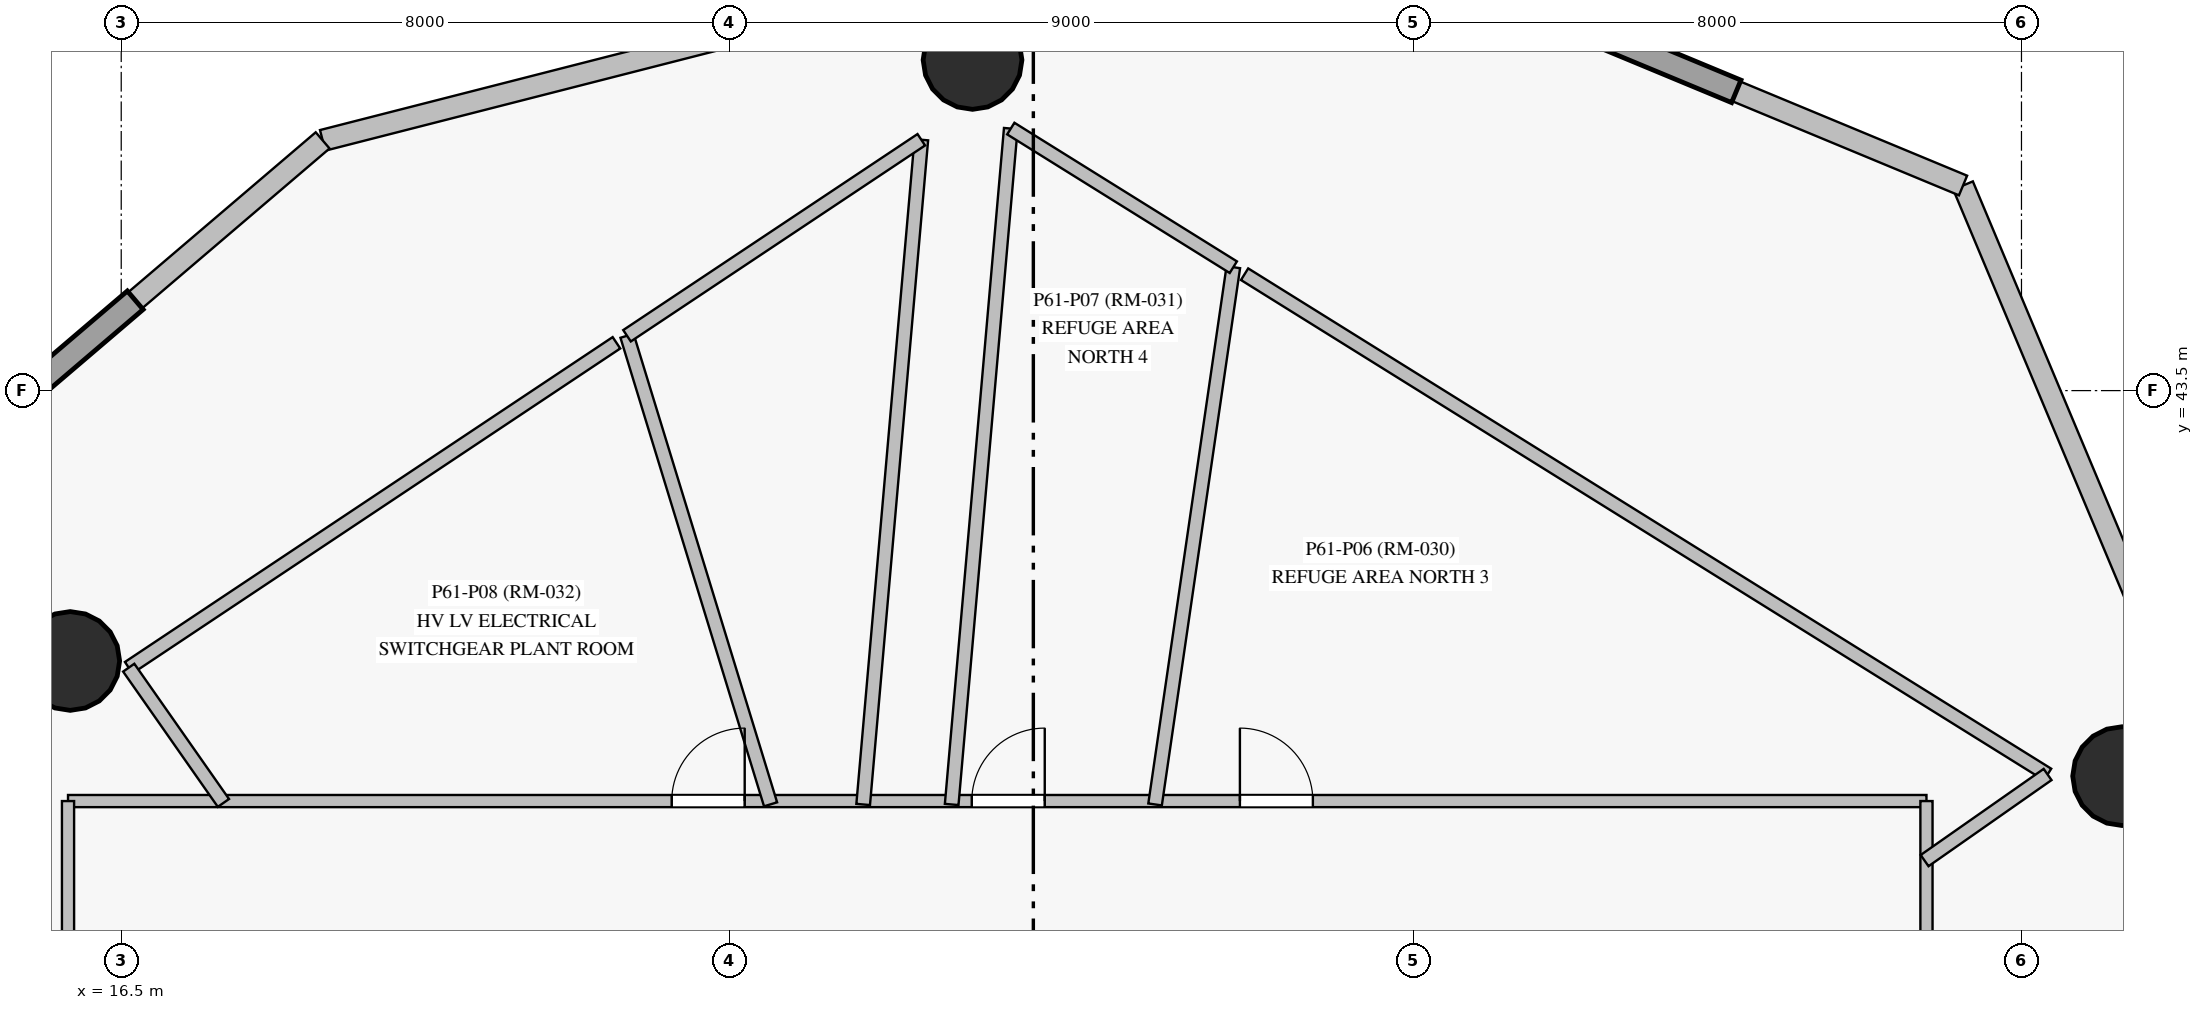
"""IFC4 building model, lengths in metres.
Left out: names, types, materials, properties, quantities, classifications, styles, units other than length and angle.
Written with IfcOpenShell. Run it as: python <this file> out.ifc"""

import sys

from ifc_helpers import new_model, si_unit, direction, frame, frame_2d, origin, origin_with_axes, origin_2d, place, context, subcontext, project, spatial, rectangle, circle, extrude, source, transform, mapped, element, fill, save


model = new_model("IFC4")
c1 = context("Model", 3, precision=1e-05, world=origin(), true_north=direction((0.0, 1.0)))
c2 = subcontext(c1, "Body", "Model", "MODEL_VIEW")
j1 = project(units=[si_unit("LENGTHUNIT", "METRE"), si_unit("PLANEANGLEUNIT", "RADIAN")], contexts=[c1])
p1 = place(None, origin())
s1 = spatial("IfcSite", under=j1, at=p1, CompositionType="ELEMENT")
p2 = place(p1, origin())
s2 = spatial("IfcBuilding", under=s1, at=p2, CompositionType="ELEMENT")
p3 = place(p2, frame((0.0, 0.0, 208.4)))
s3 = spatial("IfcBuildingStorey", under=s2, at=p3, CompositionType="ELEMENT", Elevation=208.4)
m1 = source(origin_with_axes(), c2, "Body", "SweptSolid", [
    extrude(circle(Radius=0.65, at=origin_2d()), origin(), (0.0, 0.0, 1.0), 4.5),
])
for number, where, z_axis, x_axis in (
    (1, (42.824, 38.428, 0.0), (0.0, 0.0, 1.0), (1.0, 0.0, 0.0)),
    (2, (27.7, 47.85, 0.0), (0.0, 0.0, 1.0), (1.0, 0.0, 0.0)),
    (3, (15.829, 39.943, 0.0), (0.0, 0.0, 1.0), (1.0, 0.0, 0.0)),
):
    element("IfcColumn", number, at=place(p3, frame(where, z_axis=z_axis, x_axis=x_axis)), inside=s3, PredefinedType="COLUMN", context=c2, shape_type="MappedRepresentation", body=[
        mapped(m1, transform((0.0, 0.0, 0.0), scale=1.0)),
    ])
p4 = place(p3, frame((45.891, 33.9, 0.0), z_axis=(0.0, 0.0, 1.0), x_axis=(-0.386897911947, 0.922122554616, 0.0)))
e4 = element("IfcWall", 4, at=p4, inside=s3, PredefinedType="SOLIDWALL", context=c2, shape_type="SweptSolid", body=[
    extrude(rectangle(XDim=13.337, YDim=0.28, at=frame_2d((6.668, 0.0))), origin(), (0.0, 0.0, 1.0), 4.3),
])
p5 = place(p3, frame((40.731, 46.198, 0.0), z_axis=(0.0, 0.0, 1.0), x_axis=(-0.92356916521, 0.383431867576, 0.0)))
e5 = element("IfcWall", 5, at=p5, inside=s3, PredefinedType="SOLIDWALL", context=c2, shape_type="SweptSolid", body=[
    extrude(rectangle(XDim=9.86, YDim=0.28, at=frame_2d((4.93, 0.0))), origin(), (0.0, 0.0, 1.0), 4.3),
])
p6 = place(p3, frame((31.625, 49.979, 0.0), z_axis=(0.0, 0.0, 1.0), x_axis=(-0.968880372011, -0.247529442153, 0.0)))
e6 = element("IfcWall", 6, at=p6, inside=s3, PredefinedType="SOLIDWALL", context=c2, shape_type="SweptSolid", body=[
    extrude(rectangle(XDim=12.875, YDim=0.28, at=frame_2d((6.438, 0.0))), origin(), (0.0, 0.0, 1.0), 4.3),
])
p7 = place(p3, frame((19.15, 46.792, 0.0), z_axis=(0.0, 0.0, 1.0), x_axis=(-0.760792690148, -0.648994978885, 0.0)))
e7 = element("IfcWall", 7, at=p7, inside=s3, PredefinedType="SOLIDWALL", context=c2, shape_type="SweptSolid", body=[
    extrude(rectangle(XDim=9.882, YDim=0.28, at=frame_2d((4.941, 0.0))), origin(), (0.0, 0.0, 1.0), 4.3),
])
p8 = place(p3, frame((15.8, 38.1, 0.0), z_axis=(0.0, 0.0, 1.0), x_axis=(1.0, 0.0, 0.0)))
e8 = element("IfcWall", 8, at=p8, inside=s3, PredefinedType="PARTITIONING", context=c2, shape_type="SweptSolid", body=[
    extrude(rectangle(XDim=24.45, YDim=0.16, at=frame_2d((12.225, 0.0))), origin(), (0.0, 0.0, 1.0), 3.0),
])
p9 = place(p8, frame((15.417, 0.0, 0.0)))
e9 = element("IfcOpeningElement", 9, at=p9, cuts=e8, PredefinedType="OPENING", context=c2, shape_type="SweptSolid", body=[
    extrude(rectangle(XDim=0.96, YDim=2.15, at=frame_2d((0.48, 1.075))), frame((0.0, 0.09, 0.0), z_axis=(0.0, -1.0, 0.0), x_axis=(1.0, 0.0, 0.0)), (0.0, 0.0, 1.0), 0.18),
])
p10 = place(p8, frame((11.89, 0.0, 0.0)))
e10 = element("IfcOpeningElement", 10, at=p10, cuts=e8, PredefinedType="OPENING", context=c2, shape_type="SweptSolid", body=[
    extrude(rectangle(XDim=0.96, YDim=2.15, at=frame_2d((0.48, 1.075))), frame((0.0, 0.09, 0.0), z_axis=(0.0, -1.0, 0.0), x_axis=(1.0, 0.0, 0.0)), (0.0, 0.0, 1.0), 0.18),
])
p11 = place(p8, frame((7.942, 0.0, 0.0)))
e11 = element("IfcOpeningElement", 11, at=p11, cuts=e8, PredefinedType="OPENING", context=c2, shape_type="SweptSolid", body=[
    extrude(rectangle(XDim=0.96, YDim=2.15, at=frame_2d((0.48, 1.075))), frame((0.0, 0.09, 0.0), z_axis=(0.0, -1.0, 0.0), x_axis=(1.0, 0.0, 0.0)), (0.0, 0.0, 1.0), 0.18),
])
p12 = place(p3, frame((15.8, 15.1, 0.0), z_axis=(0.0, 0.0, 1.0), x_axis=(0.0, 1.0, 0.0)))
e12 = element("IfcWall", 12, at=p12, inside=s3, PredefinedType="PARTITIONING", context=c2, shape_type="SweptSolid", body=[
    extrude(rectangle(XDim=23.0, YDim=0.16, at=frame_2d((11.5, 0.0))), origin(), (0.0, 0.0, 1.0), 3.0),
])
p13 = place(p12, frame((11.025, 0.0, 0.0)))
e13 = element("IfcOpeningElement", 13, at=p13, cuts=e12, PredefinedType="OPENING", context=c2, shape_type="SweptSolid", body=[
    extrude(rectangle(XDim=0.96, YDim=2.15, at=frame_2d((0.48, 1.075))), frame((0.0, 0.09, 0.0), z_axis=(0.0, -1.0, 0.0), x_axis=(1.0, 0.0, 0.0)), (0.0, 0.0, 1.0), 0.18),
])
p14 = place(p3, frame((40.25, 38.1, 0.0), z_axis=(0.0, 0.0, 1.0), x_axis=(0.0, -1.0, 0.0)))
e14 = element("IfcWall", 14, at=p14, inside=s3, PredefinedType="PARTITIONING", context=c2, shape_type="SweptSolid", body=[
    extrude(rectangle(XDim=23.0, YDim=0.16, at=frame_2d((11.5, 0.0))), origin(), (0.0, 0.0, 1.0), 3.0),
])
p15 = place(p3, frame((31.279, 45.031, 0.0), z_axis=(0.0, 0.0, 1.0), x_axis=(0.848769854384, -0.528762455445, 0.0)))
e15 = element("IfcWall", 15, at=p15, inside=s3, PredefinedType="PARTITIONING", context=c2, shape_type="SweptSolid", body=[
    extrude(rectangle(XDim=12.447, YDim=0.18, at=frame_2d((6.224, 0.0))), origin(), (0.0, 0.0, 1.0), 3.4),
])
p16 = place(p3, frame((27.426, 38.055, 0.0), z_axis=(0.0, 0.0, 1.0), x_axis=(0.087139468031, 0.996196121811, 0.0)))
e16 = element("IfcWall", 16, at=p16, inside=s3, PredefinedType="PARTITIONING", context=c2, shape_type="SweptSolid", body=[
    extrude(rectangle(XDim=8.926, YDim=0.18, at=frame_2d((4.463, 0.0))), origin(), (0.0, 0.0, 1.0), 2.8),
])
p17 = place(p3, frame((27.026, 46.8, 0.0), z_axis=(0.0, 0.0, 1.0), x_axis=(-0.08710485024, -0.996199149299, 0.0)))
e17 = element("IfcWall", 17, at=p17, inside=s3, PredefinedType="PARTITIONING", context=c2, shape_type="SweptSolid", body=[
    extrude(rectangle(XDim=8.779, YDim=0.18, at=frame_2d((4.389, 0.0))), origin(), (0.0, 0.0, 1.0), 2.8),
])
p18 = place(p3, frame((16.599, 39.855, 0.0), z_axis=(0.0, 0.0, 1.0), x_axis=(0.832284063484, 0.554349382313, 0.0)))
e18 = element("IfcWall", 18, at=p18, inside=s3, PredefinedType="PARTITIONING", context=c2, shape_type="SweptSolid", body=[
    extrude(rectangle(XDim=7.71, YDim=0.18, at=frame_2d((3.855, 0.0))), origin(), (0.0, 0.0, 1.0), 3.4),
])
p19 = place(p3, frame((31.131, 45.124, 0.0), z_axis=(0.0, 0.0, 1.0), x_axis=(-0.144105380013, -0.98956234743, 0.0)))
e19 = element("IfcWall", 19, at=p19, inside=s3, PredefinedType="PARTITIONING", context=c2, shape_type="SweptSolid", body=[
    extrude(rectangle(XDim=7.143, YDim=0.18, at=frame_2d((3.571, 0.0))), origin(), (0.0, 0.0, 1.0), 4.3),
])
p20 = place(p3, frame((25.043, 38.057, 0.0), z_axis=(0.0, 0.0, 1.0), x_axis=(-0.292936128544, 0.956132012116, 0.0)))
e20 = element("IfcWall", 20, at=p20, inside=s3, PredefinedType="PARTITIONING", context=c2, shape_type="SweptSolid", body=[
    extrude(rectangle(XDim=6.447, YDim=0.18, at=frame_2d((3.224, 0.0))), origin(), (0.0, 0.0, 1.0), 4.3),
])
p21 = place(p3, frame((23.154, 44.221, 0.0), z_axis=(0.0, 0.0, 1.0), x_axis=(0.832268234506, 0.554373146745, 0.0)))
e21 = element("IfcWall", 21, at=p21, inside=s3, PredefinedType="PARTITIONING", context=c2, shape_type="SweptSolid", body=[
    extrude(rectangle(XDim=4.652, YDim=0.18, at=frame_2d((2.326, 0.0))), origin(), (0.0, 0.0, 1.0), 3.4),
])
p22 = place(p3, frame((28.203, 46.948, 0.0), z_axis=(0.0, 0.0, 1.0), x_axis=(0.848741072859, -0.528808652767, 0.0)))
e22 = element("IfcWall", 22, at=p22, inside=s3, PredefinedType="PARTITIONING", context=c2, shape_type="SweptSolid", body=[
    extrude(rectangle(XDim=3.449, YDim=0.18, at=frame_2d((1.725, 0.0))), origin(), (0.0, 0.0, 1.0), 3.4),
])
p23 = place(p3, frame((17.844, 38.075, 0.0), z_axis=(0.0, 0.0, 1.0), x_axis=(-0.573515142828, 0.819194959058, 0.0)))
e23 = element("IfcWall", 23, at=p23, inside=s3, PredefinedType="PARTITIONING", context=c2, shape_type="SweptSolid", body=[
    extrude(rectangle(XDim=2.172, YDim=0.18, at=frame_2d((1.086, 0.0))), origin(), (0.0, 0.0, 1.0), 2.8),
])
p24 = place(p3, frame((41.844, 38.45, 0.0), z_axis=(0.0, 0.0, 1.0), x_axis=(-0.819133219737, -0.573603319659, 0.0)))
e24 = element("IfcWall", 24, at=p24, inside=s3, PredefinedType="PARTITIONING", context=c2, shape_type="SweptSolid", body=[
    extrude(rectangle(XDim=1.976, YDim=0.18, at=frame_2d((0.988, 0.0))), origin(), (0.0, 0.0, 1.0), 2.8),
])
m2 = source(origin_with_axes(), c2, "Body", "SweptSolid", [
    extrude(rectangle(XDim=0.96, YDim=2.15, at=frame_2d((0.48, 1.075))), frame((0.0, 0.025, 0.0), z_axis=(0.0, -1.0, 0.0), x_axis=(1.0, 0.0, 0.0)), (0.0, 0.0, 1.0), 0.05),
])
p25 = place(p9, origin())
e25 = element("IfcDoor", 25, at=p25, inside=s3, OperationType="SINGLE_SWING_LEFT", PredefinedType="DOOR", context=c2, shape_type="MappedRepresentation", body=[
    mapped(m2, transform((0.0, 0.0, 0.0), scale=1.0)),
])
fill(e9, e25)
p26 = place(p10, origin())
e26 = element("IfcDoor", 26, at=p26, inside=s3, OperationType="SINGLE_SWING_RIGHT", PredefinedType="DOOR", context=c2, shape_type="MappedRepresentation", body=[
    mapped(m2, transform((0.0, 0.0, 0.0), scale=1.0)),
])
fill(e10, e26)
p27 = place(p11, origin())
e27 = element("IfcDoor", 27, at=p27, inside=s3, OperationType="SINGLE_SWING_RIGHT", PredefinedType="DOOR", context=c2, shape_type="MappedRepresentation", body=[
    mapped(m2, transform((0.0, 0.0, 0.0), scale=1.0)),
])
fill(e11, e27)
save(model, sys.argv[1])
